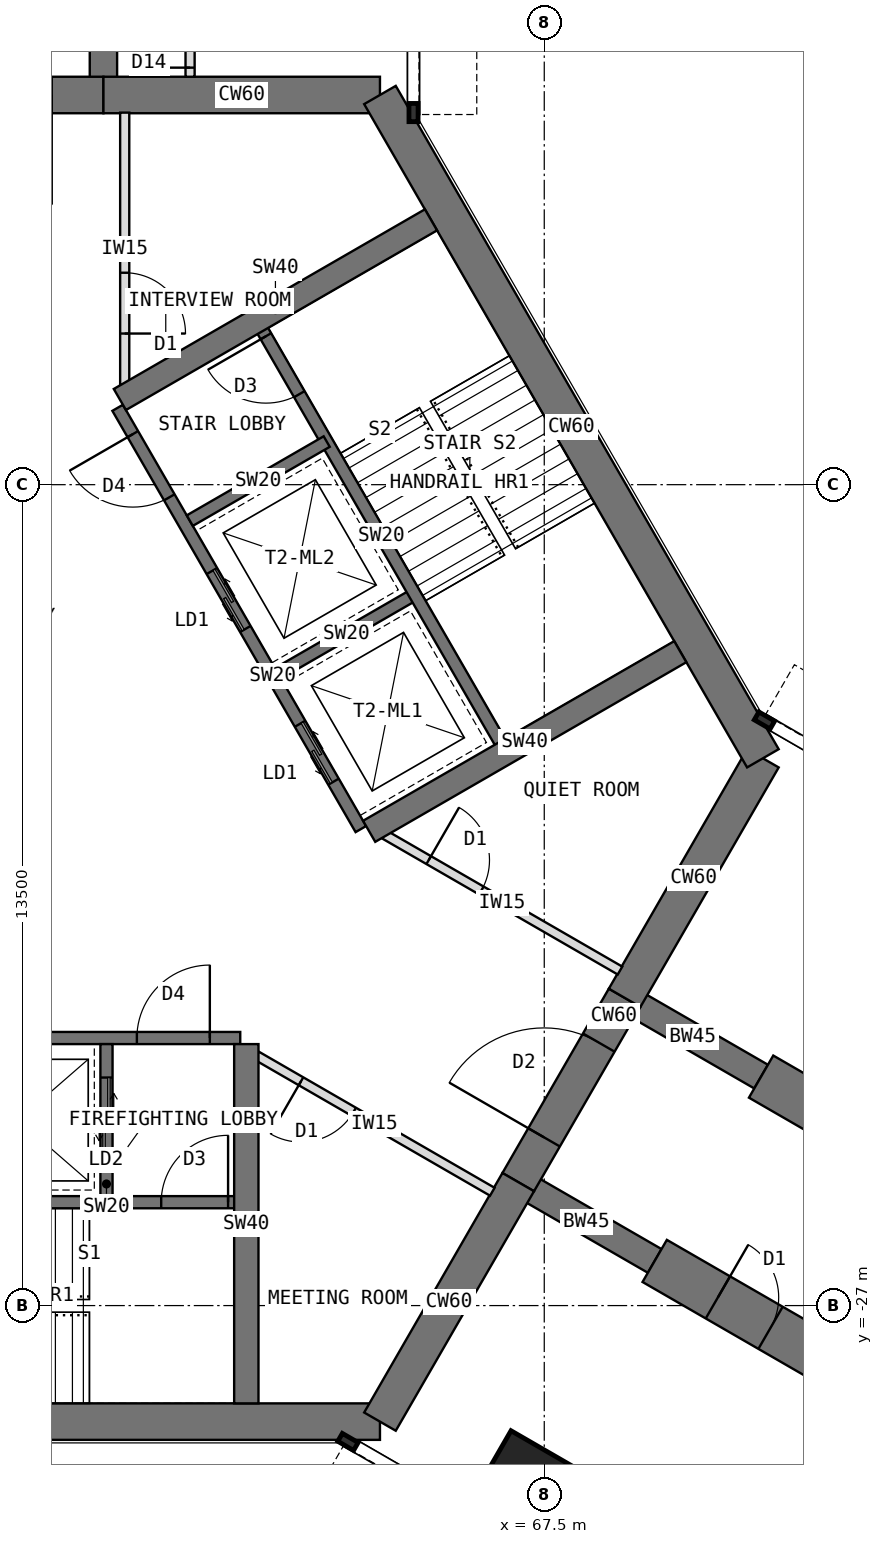
"""IFC4 building model, lengths in metres.
Left out: names, types, materials, properties, quantities, classifications, styles, units other than length and angle.
Written with IfcOpenShell. Run it as: python <this file> out.ifc"""

import sys

from ifc_helpers import new_model, si_unit, direction, frame, frame_2d, origin, origin_2d, place, context, subcontext, project, spatial, rectangle, extrude, element, fill, save


model = new_model("IFC4")
c1 = context("Model", 3, precision=1e-05, world=origin(), true_north=direction((0.0, 1.0)))
c2 = subcontext(c1, "Body", "Model", "MODEL_VIEW")
j1 = project(units=[si_unit("LENGTHUNIT", "METRE"), si_unit("PLANEANGLEUNIT", "RADIAN")], contexts=[c1])
p1 = place(None, origin())
s1 = spatial("IfcSite", under=j1, at=p1, CompositionType="ELEMENT")
p2 = place(p1, origin())
s2 = spatial("IfcBuilding", under=s1, at=p2, CompositionType="ELEMENT")
p3 = place(p2, frame((0.0, 0.0, 133.5)))
s3 = spatial("IfcBuildingStorey", under=s2, at=p3, CompositionType="ELEMENT", Elevation=133.5)
p4 = place(p3, frame((64.798, -7.092, 0.0), z_axis=(0.0, 0.0, 1.0), x_axis=(-1.0, 0.0, 0.0)))
e1 = element("IfcWall", 1, at=p4, inside=s3, PredefinedType="SHEAR", context=c2, shape_type="SweptSolid", body=[
    extrude(rectangle(XDim=4.548, YDim=0.6, at=frame_2d((2.274, 0.0))), origin(), (0.0, 0.0, 1.0), 4.0),
])
p5 = place(p3, frame((60.25, -7.092, 0.0), z_axis=(0.0, 0.0, 1.0), x_axis=(-1.0, 0.0, 0.0)))
e2 = element("IfcWall", 2, at=p5, inside=s3, PredefinedType="SHEAR", context=c2, shape_type="SweptSolid", body=[
    extrude(rectangle(XDim=3.5, YDim=0.6, at=frame_2d((1.75, 0.0))), origin(), (0.0, 0.0, 1.0), 4.0),
])
p6 = place(p5, frame((0.85, 0.0, 0.0)))
e3 = element("IfcOpeningElement", 3, at=p6, cuts=e2, PredefinedType="OPENING", context=c2, shape_type="SweptSolid", body=[
    extrude(rectangle(XDim=1.8, YDim=2.1, at=frame_2d((0.9, 1.05))), frame((0.0, 0.31, 0.0), z_axis=(0.0, -1.0, 0.0), x_axis=(1.0, 0.0, 0.0)), (0.0, 0.0, 1.0), 0.62),
])
p7 = place(p3, frame((52.202, -28.908, 0.0), z_axis=(0.0, 0.0, 1.0), x_axis=(1.0, 0.0, 0.0)))
e4 = element("IfcWall", 4, at=p7, inside=s3, PredefinedType="SHEAR", context=c2, shape_type="SweptSolid", body=[
    extrude(rectangle(XDim=12.596, YDim=0.6, at=frame_2d((6.298, 0.0))), origin(), (0.0, 0.0, 1.0), 4.0),
])
p8 = place(p3, frame((64.798, -28.908, 0.0), z_axis=(0.0, 0.0, 1.0), x_axis=(0.499984222037, 0.866034513004, 0.0)))
e5 = element("IfcWall", 5, at=p8, inside=s3, PredefinedType="SHEAR", context=c2, shape_type="SweptSolid", body=[
    extrude(rectangle(XDim=4.548, YDim=0.6, at=frame_2d((2.274, 0.0))), origin(), (0.0, 0.0, 1.0), 4.0),
])
p9 = place(p3, frame((67.072, -24.97, 0.0), z_axis=(0.0, 0.0, 1.0), x_axis=(0.500010275428, 0.866019471182, 0.0)))
e6 = element("IfcWall", 6, at=p9, inside=s3, PredefinedType="SHEAR", context=c2, shape_type="SweptSolid", body=[
    extrude(rectangle(XDim=3.5, YDim=0.6, at=frame_2d((1.75, 0.0))), origin(), (0.0, 0.0, 1.0), 4.0),
])
p10 = place(p9, frame((0.85, 0.0, 0.0)))
e7 = element("IfcOpeningElement", 7, at=p10, cuts=e6, PredefinedType="OPENING", context=c2, shape_type="SweptSolid", body=[
    extrude(rectangle(XDim=1.8, YDim=2.1, at=frame_2d((0.9, 1.05))), frame((0.0, 0.31, 0.0), z_axis=(0.0, -1.0, 0.0), x_axis=(1.0, 0.0, 0.0)), (0.0, 0.0, 1.0), 0.62),
])
p11 = place(p3, frame((68.822, -21.939, 0.0), z_axis=(0.0, 0.0, 1.0), x_axis=(0.500024481964, 0.866011268655, 0.0)))
e8 = element("IfcWall", 8, at=p11, inside=s3, PredefinedType="SHEAR", context=c2, shape_type="SweptSolid", body=[
    extrude(rectangle(XDim=4.548, YDim=0.6, at=frame_2d((2.274, 0.0))), origin(), (0.0, 0.0, 1.0), 4.0),
])
p12 = place(p3, frame((71.096, -18.0, 0.0), z_axis=(0.0, 0.0, 1.0), x_axis=(-0.500005998175, 0.866021940709, 0.0)))
e9 = element("IfcWall", 9, at=p12, inside=s3, PredefinedType="SHEAR", context=c2, shape_type="SweptSolid", body=[
    extrude(rectangle(XDim=12.596, YDim=0.6, at=frame_2d((6.298, 0.0))), origin(), (0.0, 0.0, 1.0), 4.0),
])
p13 = place(p3, frame((60.25, -7.092, 0.0), z_axis=(0.0, 0.0, 1.0), x_axis=(0.0, 1.0, 0.0)))
e10 = element("IfcWall", 10, at=p13, inside=s3, PredefinedType="SHEAR", context=c2, shape_type="SweptSolid", body=[
    extrude(rectangle(XDim=2.592, YDim=0.45, at=frame_2d((1.296, 0.0))), origin(), (0.0, 0.0, 1.0), 4.0),
])
p14 = place(p3, frame((68.822, -21.939, 0.0), z_axis=(0.0, 0.0, 1.0), x_axis=(0.866072649678, -0.499918158782, 0.0)))
e11 = element("IfcWall", 11, at=p14, inside=s3, PredefinedType="SHEAR", context=c2, shape_type="SweptSolid", body=[
    extrude(rectangle(XDim=2.592, YDim=0.45, at=frame_2d((1.296, 0.0))), origin(), (0.0, 0.0, 1.0), 4.0),
])
p15 = place(p3, frame((71.066, -23.234, 0.0), z_axis=(0.0, 0.0, 1.0), x_axis=(0.86602681393, -0.499997557548, 0.0)))
e12 = element("IfcWall", 12, at=p15, inside=s3, PredefinedType="SHEAR", context=c2, shape_type="SweptSolid", body=[
    extrude(rectangle(XDim=9.5, YDim=0.8, at=frame_2d((4.75, 0.0))), origin(), (0.0, 0.0, 1.0), 4.0),
])
p16 = place(p15, frame((1.2, 0.0, 0.0)))
e13 = element("IfcOpeningElement", 13, at=p16, cuts=e12, PredefinedType="OPENING", context=c2, shape_type="SweptSolid", body=[
    extrude(rectangle(XDim=1.0, YDim=2.1, at=frame_2d((0.5, 1.05))), frame((0.0, 0.41, 0.0), z_axis=(0.0, -1.0, 0.0), x_axis=(1.0, 0.0, 0.0)), (0.0, 0.0, 1.0), 0.82),
])
p17 = place(p3, frame((67.072, -24.97, 0.0), z_axis=(0.0, 0.0, 1.0), x_axis=(0.866031863473, -0.499988811324, 0.0)))
e14 = element("IfcWall", 14, at=p17, inside=s3, PredefinedType="SHEAR", context=c2, shape_type="SweptSolid", body=[
    extrude(rectangle(XDim=2.592, YDim=0.45, at=frame_2d((1.296, 0.0))), origin(), (0.0, 0.0, 1.0), 4.0),
])
p18 = place(p3, frame((69.316, -26.266, 0.0), z_axis=(0.0, 0.0, 1.0), x_axis=(0.86602681393, -0.499997557548, 0.0)))
e15 = element("IfcWall", 15, at=p18, inside=s3, PredefinedType="SHEAR", context=c2, shape_type="SweptSolid", body=[
    extrude(rectangle(XDim=9.5, YDim=0.8, at=frame_2d((4.75, 0.0))), origin(), (0.0, 0.0, 1.0), 4.0),
])
p19 = place(p18, frame((1.2, 0.0, 0.0)))
e16 = element("IfcOpeningElement", 16, at=p19, cuts=e15, PredefinedType="OPENING", context=c2, shape_type="SweptSolid", body=[
    extrude(rectangle(XDim=1.0, YDim=2.1, at=frame_2d((0.5, 1.05))), frame((0.0, 0.41, 0.0), z_axis=(0.0, -1.0, 0.0), x_axis=(1.0, 0.0, 0.0)), (0.0, 0.0, 1.0), 0.82),
])
p20 = place(p3, frame((67.191, -29.946, 0.0), z_axis=(0.0, 0.0, 1.0), x_axis=(0.5, 0.866025403784, 0.0)))
e17 = element("IfcColumn", 17, at=p20, inside=s3, PredefinedType="COLUMN", context=c2, shape_type="SweptSolid", body=[
    extrude(rectangle(XDim=1.3, YDim=1.3, at=origin_2d()), origin(), (0.0, 0.0, 1.0), 4.0),
])
p21 = place(p3, frame((54.5, -22.6, 0.0), z_axis=(0.0, 0.0, 1.0), x_axis=(1.0, 0.0, 0.0)))
e18 = element("IfcWall", 18, at=p21, inside=s3, PredefinedType="SHEAR", context=c2, shape_type="SweptSolid", body=[
    extrude(rectangle(XDim=8.0, YDim=0.2, at=frame_2d((4.0, 0.0))), origin(), (0.0, 0.0, 1.0), 4.0),
])
p22 = place(p21, frame((6.3, 0.0, 0.0)))
e19 = element("IfcOpeningElement", 19, at=p22, cuts=e18, PredefinedType="OPENING", context=c2, shape_type="SweptSolid", body=[
    extrude(rectangle(XDim=1.2, YDim=2.1, at=frame_2d((0.6, 1.05))), frame((0.0, 0.11, 0.0), z_axis=(0.0, -1.0, 0.0), x_axis=(1.0, 0.0, 0.0)), (0.0, 0.0, 1.0), 0.22),
])
p23 = place(p21, frame((0.9, 0.0, 0.0)))
e20 = element("IfcOpeningElement", 20, at=p23, cuts=e18, PredefinedType="OPENING", context=c2, shape_type="SweptSolid", body=[
    extrude(rectangle(XDim=1.1, YDim=2.2, at=frame_2d((0.55, 1.1))), frame((0.0, 0.11, 0.0), z_axis=(0.0, -1.0, 0.0), x_axis=(1.0, 0.0, 0.0)), (0.0, 0.0, 1.0), 0.22),
])
p24 = place(p3, frame((60.3, -22.7, 0.0), z_axis=(0.0, 0.0, 1.0), x_axis=(0.0, -1.0, 0.0)))
e21 = element("IfcWall", 21, at=p24, inside=s3, PredefinedType="SHEAR", context=c2, shape_type="SweptSolid", body=[
    extrude(rectangle(XDim=2.6, YDim=0.2, at=frame_2d((1.3, 0.0))), origin(), (0.0, 0.0, 1.0), 4.0),
])
p25 = place(p24, frame((0.55, 0.0, 0.0)))
e22 = element("IfcOpeningElement", 22, at=p25, cuts=e21, PredefinedType="OPENING", context=c2, shape_type="SweptSolid", body=[
    extrude(rectangle(XDim=1.3, YDim=2.2, at=frame_2d((0.65, 1.1))), frame((0.0, 0.11, 0.0), z_axis=(0.0, -1.0, 0.0), x_axis=(1.0, 0.0, 0.0)), (0.0, 0.0, 1.0), 0.22),
])
p26 = place(p3, frame((54.5, -25.3, 0.0), z_axis=(0.0, 0.0, 1.0), x_axis=(1.0, 0.0, 0.0)))
e23 = element("IfcWall", 23, at=p26, inside=s3, PredefinedType="SHEAR", context=c2, shape_type="SweptSolid", body=[
    extrude(rectangle(XDim=8.0, YDim=0.2, at=frame_2d((4.0, 0.0))), origin(), (0.0, 0.0, 1.0), 4.0),
])
p27 = place(p26, frame((6.7, 0.0, 0.0)))
e24 = element("IfcOpeningElement", 24, at=p27, cuts=e23, PredefinedType="OPENING", context=c2, shape_type="SweptSolid", body=[
    extrude(rectangle(XDim=1.1, YDim=2.1, at=frame_2d((0.55, 1.05))), frame((0.0, 0.11, 0.0), z_axis=(0.0, -1.0, 0.0), x_axis=(1.0, 0.0, 0.0)), (0.0, 0.0, 1.0), 0.22),
])
p28 = place(p3, frame((62.6, -22.7, 0.0), z_axis=(0.0, 0.0, 1.0), x_axis=(0.0, -1.0, 0.0)))
e25 = element("IfcWall", 25, at=p28, inside=s3, PredefinedType="SHEAR", context=c2, shape_type="SweptSolid", body=[
    extrude(rectangle(XDim=5.908, YDim=0.4, at=frame_2d((2.954, 0.0))), origin(), (0.0, 0.0, 1.0), 4.0),
])
p29 = place(p3, frame((64.484, -19.164, 0.0), z_axis=(0.0, 0.0, 1.0), x_axis=(-0.49999894854, 0.866026010844, 0.0)))
e26 = element("IfcWall", 26, at=p29, inside=s3, PredefinedType="SHEAR", context=c2, shape_type="SweptSolid", body=[
    extrude(rectangle(XDim=8.0, YDim=0.2, at=frame_2d((4.0, 0.0))), origin(), (0.0, 0.0, 1.0), 4.0),
])
p30 = place(p29, frame((6.3, 0.0, 0.0)))
e27 = element("IfcOpeningElement", 27, at=p30, cuts=e26, PredefinedType="OPENING", context=c2, shape_type="SweptSolid", body=[
    extrude(rectangle(XDim=1.2, YDim=2.1, at=frame_2d((0.6, 1.05))), frame((0.0, 0.11, 0.0), z_axis=(0.0, -1.0, 0.0), x_axis=(1.0, 0.0, 0.0)), (0.0, 0.0, 1.0), 0.22),
])
p31 = place(p29, frame((0.9, 0.0, 0.0)))
e28 = element("IfcOpeningElement", 28, at=p31, cuts=e26, PredefinedType="OPENING", context=c2, shape_type="SweptSolid", body=[
    extrude(rectangle(XDim=1.1, YDim=2.2, at=frame_2d((0.55, 1.1))), frame((0.0, 0.11, 0.0), z_axis=(0.0, -1.0, 0.0), x_axis=(1.0, 0.0, 0.0)), (0.0, 0.0, 1.0), 0.22),
])
p32 = place(p29, frame((3.8, 0.0, 0.0)))
e29 = element("IfcOpeningElement", 29, at=p32, cuts=e26, PredefinedType="OPENING", context=c2, shape_type="SweptSolid", body=[
    extrude(rectangle(XDim=1.1, YDim=2.2, at=frame_2d((0.55, 1.1))), frame((0.0, 0.11, 0.0), z_axis=(0.0, -1.0, 0.0), x_axis=(1.0, 0.0, 0.0)), (0.0, 0.0, 1.0), 0.22),
])
p33 = place(p3, frame((63.12, -16.603, 0.0), z_axis=(0.0, 0.0, 1.0), x_axis=(0.866062058628, 0.499936506574, 0.0)))
e30 = element("IfcWall", 30, at=p33, inside=s3, PredefinedType="SHEAR", context=c2, shape_type="SweptSolid", body=[
    extrude(rectangle(XDim=2.6, YDim=0.2, at=frame_2d((1.3, 0.0))), origin(), (0.0, 0.0, 1.0), 4.0),
])
p34 = place(p3, frame((61.67, -14.091, 0.0), z_axis=(0.0, 0.0, 1.0), x_axis=(0.86603858612, 0.49997716683, 0.0)))
e31 = element("IfcWall", 31, at=p34, inside=s3, PredefinedType="SHEAR", context=c2, shape_type="SweptSolid", body=[
    extrude(rectangle(XDim=2.6, YDim=0.2, at=frame_2d((1.3, 0.0))), origin(), (0.0, 0.0, 1.0), 4.0),
])
p35 = place(p3, frame((66.822, -17.814, 0.0), z_axis=(0.0, 0.0, 1.0), x_axis=(-0.49999894854, 0.866026010844, 0.0)))
e32 = element("IfcWall", 32, at=p35, inside=s3, PredefinedType="SHEAR", context=c2, shape_type="SweptSolid", body=[
    extrude(rectangle(XDim=8.0, YDim=0.2, at=frame_2d((4.0, 0.0))), origin(), (0.0, 0.0, 1.0), 4.0),
])
p36 = place(p35, frame((6.7, 0.0, 0.0)))
e33 = element("IfcOpeningElement", 33, at=p36, cuts=e32, PredefinedType="OPENING", context=c2, shape_type="SweptSolid", body=[
    extrude(rectangle(XDim=1.1, YDim=2.1, at=frame_2d((0.55, 1.05))), frame((0.0, 0.11, 0.0), z_axis=(0.0, -1.0, 0.0), x_axis=(1.0, 0.0, 0.0)), (0.0, 0.0, 1.0), 0.22),
])
p37 = place(p3, frame((60.52, -12.099, 0.0), z_axis=(0.0, 0.0, 1.0), x_axis=(0.866009424208, 0.500027676417, 0.0)))
e34 = element("IfcWall", 34, at=p37, inside=s3, PredefinedType="SHEAR", context=c2, shape_type="SweptSolid", body=[
    extrude(rectangle(XDim=5.908, YDim=0.4, at=frame_2d((2.954, 0.0))), origin(), (0.0, 0.0, 1.0), 4.0),
])
p38 = place(p3, frame((64.62, -19.201, 0.0), z_axis=(0.0, 0.0, 1.0), x_axis=(0.866027317282, 0.49999668571, 0.0)))
e35 = element("IfcWall", 35, at=p38, inside=s3, PredefinedType="SHEAR", context=c2, shape_type="SweptSolid", body=[
    extrude(rectangle(XDim=5.908, YDim=0.4, at=frame_2d((2.954, 0.0))), origin(), (0.0, 0.0, 1.0), 4.0),
])
p39 = place(p3, frame((61.675, -6.792, 0.0), z_axis=(0.0, 0.0, 1.0), x_axis=(0.0, 1.0, 0.0)))
e36 = element("IfcWall", 36, at=p39, inside=s3, PredefinedType="PARTITIONING", context=c2, shape_type="SweptSolid", body=[
    extrude(rectangle(XDim=2.4, YDim=0.15, at=frame_2d((1.2, 0.0))), origin(), (0.0, 0.0, 1.0), 3.8),
])
p40 = place(p39, frame((0.15, 0.0, 0.0)))
e37 = element("IfcOpeningElement", 37, at=p40, cuts=e36, PredefinedType="OPENING", context=c2, shape_type="SweptSolid", body=[
    extrude(rectangle(XDim=0.9, YDim=2.1, at=frame_2d((0.45, 1.05))), frame((0.0, 0.085, 0.0), z_axis=(0.0, -1.0, 0.0), x_axis=(1.0, 0.0, 0.0)), (0.0, 0.0, 1.0), 0.17),
])
p41 = place(p3, frame((60.6, -7.382, 0.0), z_axis=(0.0, 0.0, 1.0), x_axis=(0.0, -1.0, 0.0)))
e38 = element("IfcWall", 38, at=p41, inside=s3, PredefinedType="PARTITIONING", context=c2, shape_type="SweptSolid", body=[
    extrude(rectangle(XDim=4.476, YDim=0.15, at=frame_2d((2.238, 0.0))), origin(), (0.0, 0.0, 1.0), 3.8),
])
p42 = place(p41, frame((2.633, 0.0, 0.0)))
e39 = element("IfcOpeningElement", 39, at=p42, cuts=e38, PredefinedType="OPENING", context=c2, shape_type="SweptSolid", body=[
    extrude(rectangle(XDim=1.0, YDim=2.1, at=frame_2d((0.5, 1.05))), frame((0.0, 0.085, 0.0), z_axis=(0.0, -1.0, 0.0), x_axis=(1.0, 0.0, 0.0)), (0.0, 0.0, 1.0), 0.17),
])
p43 = place(p3, frame((64.87, -19.253, 0.0), z_axis=(0.0, 0.0, 1.0), x_axis=(0.866025707867, -0.499999473313, 0.0)))
e40 = element("IfcWall", 40, at=p43, inside=s3, PredefinedType="PARTITIONING", context=c2, shape_type="SweptSolid", body=[
    extrude(rectangle(XDim=4.476, YDim=0.15, at=frame_2d((2.238, 0.0))), origin(), (0.0, 0.0, 1.0), 3.8),
])
p44 = place(p43, frame((0.843, 0.0, 0.0)))
e41 = element("IfcOpeningElement", 41, at=p44, cuts=e40, PredefinedType="OPENING", context=c2, shape_type="SweptSolid", body=[
    extrude(rectangle(XDim=1.0, YDim=2.1, at=frame_2d((0.5, 1.05))), frame((0.0, 0.085, 0.0), z_axis=(0.0, -1.0, 0.0), x_axis=(1.0, 0.0, 0.0)), (0.0, 0.0, 1.0), 0.17),
])
p45 = place(p3, frame((66.646, -25.128, 0.0), z_axis=(0.0, 0.0, 1.0), x_axis=(-0.866025707867, 0.499999473313, 0.0)))
e42 = element("IfcWall", 42, at=p45, inside=s3, PredefinedType="PARTITIONING", context=c2, shape_type="SweptSolid", body=[
    extrude(rectangle(XDim=4.476, YDim=0.15, at=frame_2d((2.238, 0.0))), origin(), (0.0, 0.0, 1.0), 3.8),
])
p46 = place(p45, frame((2.633, 0.0, 0.0)))
e43 = element("IfcOpeningElement", 43, at=p46, cuts=e42, PredefinedType="OPENING", context=c2, shape_type="SweptSolid", body=[
    extrude(rectangle(XDim=1.0, YDim=2.1, at=frame_2d((0.5, 1.05))), frame((0.0, 0.085, 0.0), z_axis=(0.0, -1.0, 0.0), x_axis=(1.0, 0.0, 0.0)), (0.0, 0.0, 1.0), 0.17),
])
p47 = place(p22, origin())
e44 = element("IfcDoor", 44, at=p47, inside=s3, OperationType="SINGLE_SWING_RIGHT", PredefinedType="DOOR", context=c2, shape_type="SweptSolid", body=[
    extrude(rectangle(XDim=1.2, YDim=2.1, at=frame_2d((0.6, 1.05))), frame((0.0, 0.025, 0.0), z_axis=(0.0, -1.0, 0.0), x_axis=(1.0, 0.0, 0.0)), (0.0, 0.0, 1.0), 0.05),
])
fill(e19, e44)
p48 = place(p25, origin())
e45 = element("IfcDoor", 45, at=p48, inside=s3, OperationType="DOUBLE_DOOR_SLIDING", PredefinedType="DOOR", context=c2, shape_type="SweptSolid", body=[
    extrude(rectangle(XDim=1.3, YDim=2.2, at=frame_2d((0.65, 1.1))), frame((0.0, 0.025, 0.0), z_axis=(0.0, -1.0, 0.0), x_axis=(1.0, 0.0, 0.0)), (0.0, 0.0, 1.0), 0.05),
])
fill(e22, e45)
p49 = place(p27, origin())
e46 = element("IfcDoor", 46, at=p49, inside=s3, OperationType="SINGLE_SWING_RIGHT", PredefinedType="DOOR", context=c2, shape_type="SweptSolid", body=[
    extrude(rectangle(XDim=1.1, YDim=2.1, at=frame_2d((0.55, 1.05))), frame((0.0, 0.025, 0.0), z_axis=(0.0, -1.0, 0.0), x_axis=(1.0, 0.0, 0.0)), (0.0, 0.0, 1.0), 0.05),
])
fill(e24, e46)
p50 = place(p30, origin())
e47 = element("IfcDoor", 47, at=p50, inside=s3, OperationType="SINGLE_SWING_RIGHT", PredefinedType="DOOR", context=c2, shape_type="SweptSolid", body=[
    extrude(rectangle(XDim=1.2, YDim=2.1, at=frame_2d((0.6, 1.05))), frame((0.0, 0.025, 0.0), z_axis=(0.0, -1.0, 0.0), x_axis=(1.0, 0.0, 0.0)), (0.0, 0.0, 1.0), 0.05),
])
fill(e27, e47)
p51 = place(p31, origin())
e48 = element("IfcDoor", 48, at=p51, inside=s3, OperationType="DOUBLE_DOOR_SLIDING", PredefinedType="DOOR", context=c2, shape_type="SweptSolid", body=[
    extrude(rectangle(XDim=1.1, YDim=2.2, at=frame_2d((0.55, 1.1))), frame((0.0, 0.025, 0.0), z_axis=(0.0, -1.0, 0.0), x_axis=(1.0, 0.0, 0.0)), (0.0, 0.0, 1.0), 0.05),
])
fill(e28, e48)
p52 = place(p32, origin())
e49 = element("IfcDoor", 49, at=p52, inside=s3, OperationType="DOUBLE_DOOR_SLIDING", PredefinedType="DOOR", context=c2, shape_type="SweptSolid", body=[
    extrude(rectangle(XDim=1.1, YDim=2.2, at=frame_2d((0.55, 1.1))), frame((0.0, 0.025, 0.0), z_axis=(0.0, -1.0, 0.0), x_axis=(1.0, 0.0, 0.0)), (0.0, 0.0, 1.0), 0.05),
])
fill(e29, e49)
p53 = place(p36, origin())
e50 = element("IfcDoor", 50, at=p53, inside=s3, OperationType="SINGLE_SWING_RIGHT", PredefinedType="DOOR", context=c2, shape_type="SweptSolid", body=[
    extrude(rectangle(XDim=1.1, YDim=2.1, at=frame_2d((0.55, 1.05))), frame((0.0, 0.025, 0.0), z_axis=(0.0, -1.0, 0.0), x_axis=(1.0, 0.0, 0.0)), (0.0, 0.0, 1.0), 0.05),
])
fill(e33, e50)
p54 = place(p10, origin())
e51 = element("IfcDoor", 51, at=p54, inside=s3, OperationType="DOUBLE_DOOR_DOUBLE_SWING", PredefinedType="DOOR", context=c2, shape_type="SweptSolid", body=[
    extrude(rectangle(XDim=1.72, YDim=2.06, at=frame_2d((0.9, 1.03))), frame((0.0, 0.025, 0.0), z_axis=(0.0, -1.0, 0.0), x_axis=(1.0, 0.0, 0.0)), (0.0, 0.0, 1.0), 0.05),
    extrude(rectangle(XDim=0.04, YDim=2.1, at=frame_2d((0.02, 1.05))), frame((0.0, 0.3, 0.0), z_axis=(0.0, -1.0, 0.0), x_axis=(1.0, 0.0, 0.0)), (0.0, 0.0, 1.0), 0.6),
    extrude(rectangle(XDim=0.04, YDim=2.1, at=frame_2d((1.78, 1.05))), frame((0.0, 0.3, 0.0), z_axis=(0.0, -1.0, 0.0), x_axis=(1.0, 0.0, 0.0)), (0.0, 0.0, 1.0), 0.6),
    extrude(rectangle(XDim=1.72, YDim=0.04, at=frame_2d((0.9, 2.08))), frame((0.0, 0.3, 0.0), z_axis=(0.0, -1.0, 0.0), x_axis=(1.0, 0.0, 0.0)), (0.0, 0.0, 1.0), 0.6),
])
fill(e7, e51)
p55 = place(p40, origin())
e52 = element("IfcDoor", 52, at=p55, inside=s3, OperationType="SINGLE_SWING_LEFT", PredefinedType="DOOR", context=c2, shape_type="SweptSolid", body=[
    extrude(rectangle(XDim=0.9, YDim=2.1, at=frame_2d((0.45, 1.05))), frame((0.0, 0.025, 0.0), z_axis=(0.0, -1.0, 0.0), x_axis=(1.0, 0.0, 0.0)), (0.0, 0.0, 1.0), 0.05),
])
fill(e37, e52)
p56 = place(p46, origin())
e53 = element("IfcDoor", 53, at=p56, inside=s3, OperationType="SINGLE_SWING_RIGHT", PredefinedType="DOOR", context=c2, shape_type="SweptSolid", body=[
    extrude(rectangle(XDim=1.0, YDim=2.1, at=frame_2d((0.5, 1.05))), frame((0.0, 0.025, 0.0), z_axis=(0.0, -1.0, 0.0), x_axis=(1.0, 0.0, 0.0)), (0.0, 0.0, 1.0), 0.05),
])
fill(e43, e53)
p57 = place(p44, origin())
e54 = element("IfcDoor", 54, at=p57, inside=s3, OperationType="SINGLE_SWING_LEFT", PredefinedType="DOOR", context=c2, shape_type="SweptSolid", body=[
    extrude(rectangle(XDim=1.0, YDim=2.1, at=frame_2d((0.5, 1.05))), frame((0.0, 0.025, 0.0), z_axis=(0.0, -1.0, 0.0), x_axis=(1.0, 0.0, 0.0)), (0.0, 0.0, 1.0), 0.05),
])
fill(e41, e54)
p58 = place(p42, origin())
e55 = element("IfcDoor", 55, at=p58, inside=s3, OperationType="SINGLE_SWING_RIGHT", PredefinedType="DOOR", context=c2, shape_type="SweptSolid", body=[
    extrude(rectangle(XDim=1.0, YDim=2.1, at=frame_2d((0.5, 1.05))), frame((0.0, 0.025, 0.0), z_axis=(0.0, -1.0, 0.0), x_axis=(1.0, 0.0, 0.0)), (0.0, 0.0, 1.0), 0.05),
])
fill(e39, e55)
p59 = place(p19, origin())
e56 = element("IfcDoor", 56, at=p59, inside=s3, OperationType="SINGLE_SWING_LEFT", PredefinedType="DOOR", context=c2, shape_type="SweptSolid", body=[
    extrude(rectangle(XDim=0.92, YDim=2.06, at=frame_2d((0.5, 1.03))), frame((0.0, 0.025, 0.0), z_axis=(0.0, -1.0, 0.0), x_axis=(1.0, 0.0, 0.0)), (0.0, 0.0, 1.0), 0.05),
    extrude(rectangle(XDim=0.04, YDim=2.1, at=frame_2d((0.02, 1.05))), frame((0.0, 0.4, 0.0), z_axis=(0.0, -1.0, 0.0), x_axis=(1.0, 0.0, 0.0)), (0.0, 0.0, 1.0), 0.8),
    extrude(rectangle(XDim=0.04, YDim=2.1, at=frame_2d((0.98, 1.05))), frame((0.0, 0.4, 0.0), z_axis=(0.0, -1.0, 0.0), x_axis=(1.0, 0.0, 0.0)), (0.0, 0.0, 1.0), 0.8),
    extrude(rectangle(XDim=0.92, YDim=0.04, at=frame_2d((0.5, 2.08))), frame((0.0, 0.4, 0.0), z_axis=(0.0, -1.0, 0.0), x_axis=(1.0, 0.0, 0.0)), (0.0, 0.0, 1.0), 0.8),
])
fill(e16, e56)
save(model, sys.argv[1])
